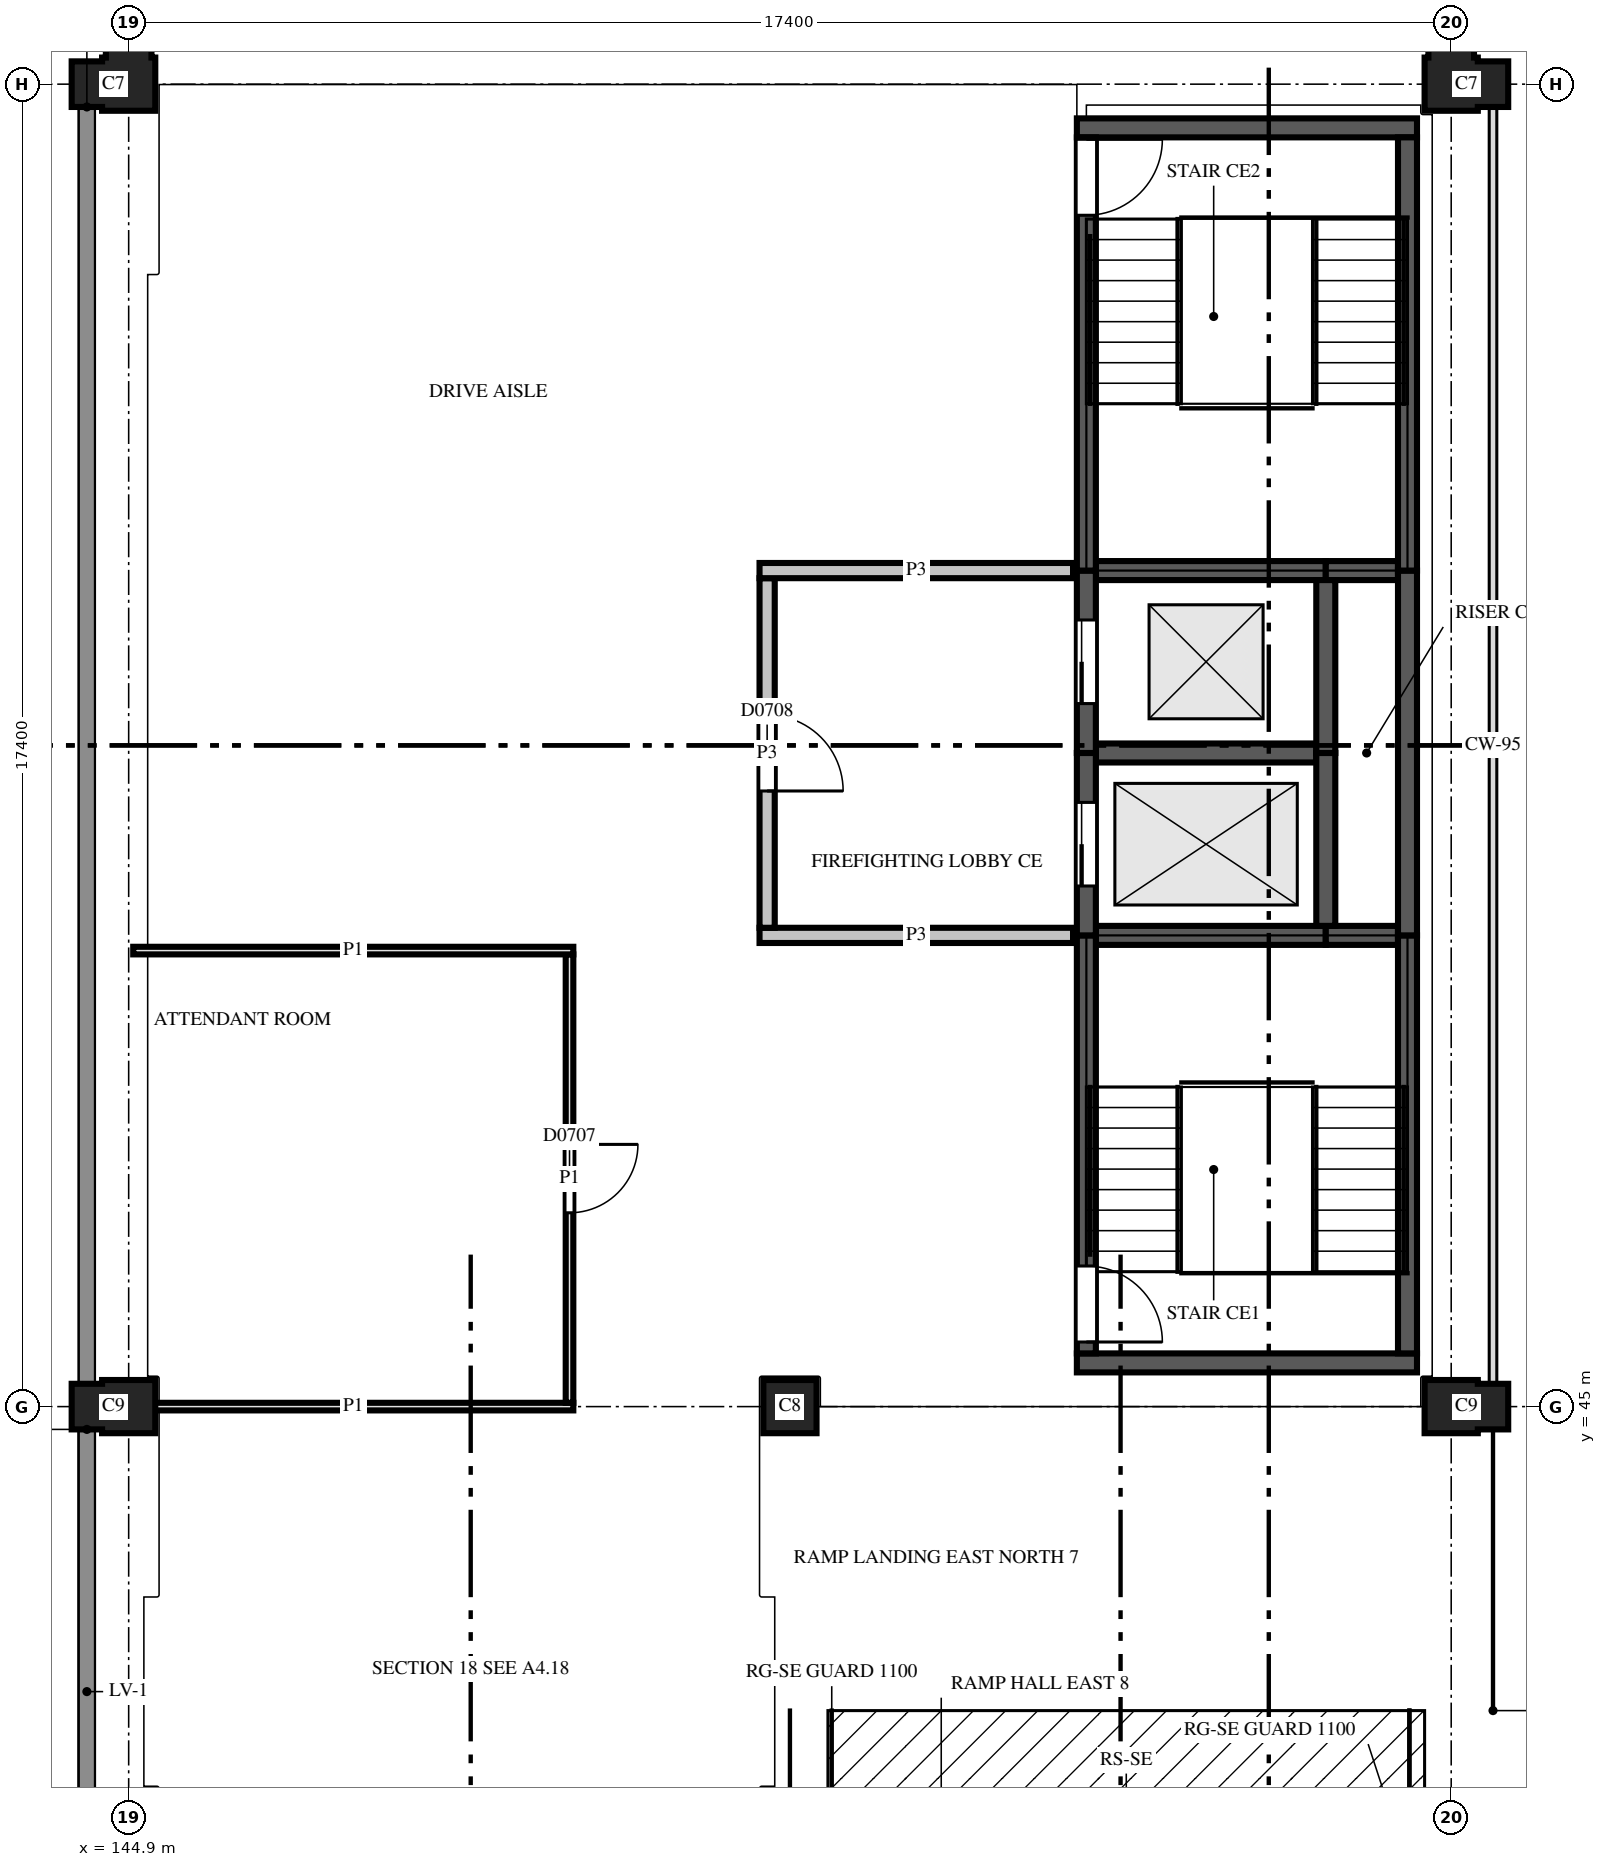
"""IFC4 building model, lengths in metres.
Left out: names, types, materials, properties, quantities, classifications, styles, units other than length and angle.
Written with IfcOpenShell. Run it as: python <this file> out.ifc"""

import sys

from ifc_helpers import new_model, si_unit, direction, frame, frame_2d, origin, place, context, subcontext, project, spatial, polyline, rectangle, outline, extrude, element, fill, save


model = new_model("IFC4")
c1 = context("Model", 3, precision=1e-05, world=origin(), true_north=direction((0.0, 1.0)))
c2 = subcontext(c1, "Body", "Model", "MODEL_VIEW")
j1 = project(units=[si_unit("LENGTHUNIT", "METRE"), si_unit("PLANEANGLEUNIT", "RADIAN")], contexts=[c1])
p1 = place(None, origin())
s1 = spatial("IfcSite", under=j1, at=p1, CompositionType="ELEMENT")
p2 = place(p1, origin())
s2 = spatial("IfcBuilding", under=s1, at=p2, CompositionType="ELEMENT")
p3 = place(p2, frame((0.0, 0.0, 26.7)))
s3 = spatial("IfcBuildingStorey", under=s2, at=p3, CompositionType="ELEMENT", Elevation=26.7)
p4 = place(p3, frame((144.9, 45.0, 0.0), z_axis=(0.0, 0.0, 1.0), x_axis=(-1.0, 0.0, 0.0)))
e1 = element("IfcColumn", 1, at=p4, inside=s3, PredefinedType="COLUMN", context=c2, shape_type="SweptSolid", body=[
    extrude(outline(polyline([(-0.35, -0.35), (0.35, -0.35), (0.35, -0.3), (0.75, -0.3), (0.75, 0.3), (0.35, 0.3), (0.35, 0.35), (-0.35, 0.35), (-0.35, -0.35)])), origin(), (0.0, 0.0, 1.0), 3.7),
])
p5 = place(p3, frame((153.6, 45.0, 0.0), z_axis=(0.0, 0.0, 1.0), x_axis=(1.0, 0.0, 0.0)))
e2 = element("IfcColumn", 2, at=p5, inside=s3, PredefinedType="COLUMN", context=c2, shape_type="SweptSolid", body=[
    extrude(outline(polyline([(-0.35, -0.35), (0.35, -0.35), (0.35, 0.35), (-0.35, 0.35), (-0.35, -0.35)])), origin(), (0.0, 0.0, 1.0), 3.7),
])
p6 = place(p3, frame((162.3, 45.0, 0.0), z_axis=(0.0, 0.0, 1.0), x_axis=(1.0, 0.0, 0.0)))
e3 = element("IfcColumn", 3, at=p6, inside=s3, PredefinedType="COLUMN", context=c2, shape_type="SweptSolid", body=[
    extrude(outline(polyline([(-0.35, -0.35), (0.35, -0.35), (0.35, -0.3), (0.75, -0.3), (0.75, 0.3), (0.35, 0.3), (0.35, 0.35), (-0.35, 0.35), (-0.35, -0.35)])), origin(), (0.0, 0.0, 1.0), 3.7),
])
for number, where, z_axis, x_axis in (
    (4, (144.9, 62.4, 0.0), (0.0, 0.0, 1.0), (0.0, 1.0, 0.0)),
    (5, (162.3, 62.4, 0.0), (0.0, 0.0, 1.0), (1.0, 0.0, 0.0)),
):
    element("IfcColumn", number, at=place(p3, frame(where, z_axis=z_axis, x_axis=x_axis)), inside=s3, PredefinedType="COLUMN", context=c2, shape_type="SweptSolid", body=[
        extrude(outline(polyline([(-0.35, -0.35), (0.35, -0.35), (0.35, -0.3), (0.75, -0.3), (0.75, 0.3), (0.35, 0.3), (0.35, 0.35), (0.3, 0.35), (0.3, 0.75), (-0.3, 0.75), (-0.3, 0.35), (-0.35, 0.35), (-0.35, -0.35)])), origin(), (0.0, 0.0, 1.0), 3.7),
    ])
p7 = place(p3, frame((157.375, 45.575, 0.0), z_axis=(0.0, 0.0, 1.0), x_axis=(1.0, 0.0, 0.0)))
e6 = element("IfcWall", 6, at=p7, inside=s3, PredefinedType="SHEAR", context=c2, shape_type="SweptSolid", body=[
    extrude(rectangle(XDim=4.475, YDim=0.25, at=frame_2d((2.238, 0.0))), origin(), (0.0, 0.0, 1.0), 3.7),
])
p8 = place(p3, frame((157.625, 51.2, 0.0), z_axis=(0.0, 0.0, 1.0), x_axis=(1.0, 0.0, 0.0)))
e7 = element("IfcWall", 7, at=p8, inside=s3, PredefinedType="SHEAR", context=c2, shape_type="SweptSolid", body=[
    extrude(rectangle(XDim=3.025, YDim=0.25, at=frame_2d((1.512, 0.0))), origin(), (0.0, 0.0, 1.0), 3.7),
])
p9 = place(p3, frame((160.65, 51.2, 0.0), z_axis=(0.0, 0.0, 1.0), x_axis=(1.0, 0.0, 0.0)))
e8 = element("IfcWall", 8, at=p9, inside=s3, PredefinedType="SHEAR", context=c2, shape_type="SweptSolid", body=[
    extrude(rectangle(XDim=0.95, YDim=0.25, at=frame_2d((0.475, 0.0))), origin(), (0.0, 0.0, 1.0), 3.7),
])
p10 = place(p3, frame((157.625, 53.6, 0.0), z_axis=(0.0, 0.0, 1.0), x_axis=(1.0, 0.0, 0.0)))
e9 = element("IfcWall", 9, at=p10, inside=s3, PredefinedType="SHEAR", context=c2, shape_type="SweptSolid", body=[
    extrude(rectangle(XDim=2.9, YDim=0.25, at=frame_2d((1.45, 0.0))), origin(), (0.0, 0.0, 1.0), 3.7),
])
p11 = place(p3, frame((157.625, 56.0, 0.0), z_axis=(0.0, 0.0, 1.0), x_axis=(1.0, 0.0, 0.0)))
e10 = element("IfcWall", 10, at=p11, inside=s3, PredefinedType="SHEAR", context=c2, shape_type="SweptSolid", body=[
    extrude(rectangle(XDim=3.025, YDim=0.25, at=frame_2d((1.512, 0.0))), origin(), (0.0, 0.0, 1.0), 3.7),
])
p12 = place(p3, frame((160.65, 56.0, 0.0), z_axis=(0.0, 0.0, 1.0), x_axis=(1.0, 0.0, 0.0)))
e11 = element("IfcWall", 11, at=p12, inside=s3, PredefinedType="SHEAR", context=c2, shape_type="SweptSolid", body=[
    extrude(rectangle(XDim=0.95, YDim=0.25, at=frame_2d((0.475, 0.0))), origin(), (0.0, 0.0, 1.0), 3.7),
])
p13 = place(p3, frame((157.375, 61.825, 0.0), z_axis=(0.0, 0.0, 1.0), x_axis=(1.0, 0.0, 0.0)))
e12 = element("IfcWall", 12, at=p13, inside=s3, PredefinedType="SHEAR", context=c2, shape_type="SweptSolid", body=[
    extrude(rectangle(XDim=4.475, YDim=0.25, at=frame_2d((2.238, 0.0))), origin(), (0.0, 0.0, 1.0), 3.7),
])
p14 = place(p3, frame((157.5, 45.7, 0.0), z_axis=(0.0, 0.0, 1.0), x_axis=(0.0, 1.0, 0.0)))
e13 = element("IfcWall", 13, at=p14, inside=s3, PredefinedType="SHEAR", context=c2, shape_type="SweptSolid", body=[
    extrude(rectangle(XDim=5.5, YDim=0.25, at=frame_2d((2.75, 0.0))), origin(), (0.0, 0.0, 1.0), 3.7),
])
p15 = place(p14, frame((0.15, 0.0, 0.0)))
e14 = element("IfcOpeningElement", 14, at=p15, cuts=e13, PredefinedType="OPENING", context=c2, shape_type="SweptSolid", body=[
    extrude(rectangle(XDim=1.0, YDim=2.1, at=frame_2d((0.5, 1.05))), frame((0.0, 0.135, 0.0), z_axis=(0.0, -1.0, 0.0), x_axis=(1.0, 0.0, 0.0)), (0.0, 0.0, 1.0), 0.27),
])
p16 = place(p3, frame((157.5, 51.2, 0.0), z_axis=(0.0, 0.0, 1.0), x_axis=(0.0, 1.0, 0.0)))
e15 = element("IfcWall", 15, at=p16, inside=s3, PredefinedType="SHEAR", context=c2, shape_type="SweptSolid", body=[
    extrude(rectangle(XDim=2.4, YDim=0.25, at=frame_2d((1.2, 0.0))), origin(), (0.0, 0.0, 1.0), 3.7),
])
p17 = place(p16, frame((0.65, 0.0, 0.0)))
e16 = element("IfcOpeningElement", 16, at=p17, cuts=e15, PredefinedType="OPENING", context=c2, shape_type="SweptSolid", body=[
    extrude(rectangle(XDim=1.1, YDim=2.1, at=frame_2d((0.55, 1.05))), frame((0.0, 0.135, 0.0), z_axis=(0.0, -1.0, 0.0), x_axis=(1.0, 0.0, 0.0)), (0.0, 0.0, 1.0), 0.27),
])
p18 = place(p3, frame((157.5, 53.6, 0.0), z_axis=(0.0, 0.0, 1.0), x_axis=(0.0, 1.0, 0.0)))
e17 = element("IfcWall", 17, at=p18, inside=s3, PredefinedType="SHEAR", context=c2, shape_type="SweptSolid", body=[
    extrude(rectangle(XDim=2.4, YDim=0.25, at=frame_2d((1.2, 0.0))), origin(), (0.0, 0.0, 1.0), 3.7),
])
p19 = place(p18, frame((0.65, 0.0, 0.0)))
e18 = element("IfcOpeningElement", 18, at=p19, cuts=e17, PredefinedType="OPENING", context=c2, shape_type="SweptSolid", body=[
    extrude(rectangle(XDim=1.1, YDim=2.1, at=frame_2d((0.55, 1.05))), frame((0.0, 0.135, 0.0), z_axis=(0.0, -1.0, 0.0), x_axis=(1.0, 0.0, 0.0)), (0.0, 0.0, 1.0), 0.27),
])
p20 = place(p3, frame((157.5, 56.0, 0.0), z_axis=(0.0, 0.0, 1.0), x_axis=(0.0, 1.0, 0.0)))
e19 = element("IfcWall", 19, at=p20, inside=s3, PredefinedType="SHEAR", context=c2, shape_type="SweptSolid", body=[
    extrude(rectangle(XDim=5.7, YDim=0.25, at=frame_2d((2.85, 0.0))), origin(), (0.0, 0.0, 1.0), 3.7),
])
p21 = place(p20, frame((4.675, 0.0, 0.0)))
e20 = element("IfcOpeningElement", 20, at=p21, cuts=e19, PredefinedType="OPENING", context=c2, shape_type="SweptSolid", body=[
    extrude(rectangle(XDim=1.0, YDim=2.1, at=frame_2d((0.5, 1.05))), frame((0.0, 0.135, 0.0), z_axis=(0.0, -1.0, 0.0), x_axis=(1.0, 0.0, 0.0)), (0.0, 0.0, 1.0), 0.27),
])
p22 = place(p3, frame((160.65, 51.325, 0.0), z_axis=(0.0, 0.0, 1.0), x_axis=(0.0, 1.0, 0.0)))
e21 = element("IfcWall", 21, at=p22, inside=s3, PredefinedType="SHEAR", context=c2, shape_type="SweptSolid", body=[
    extrude(rectangle(XDim=2.275, YDim=0.25, at=frame_2d((1.138, 0.0))), origin(), (0.0, 0.0, 1.0), 3.7),
])
p23 = place(p3, frame((160.65, 53.6, 0.0), z_axis=(0.0, 0.0, 1.0), x_axis=(0.0, 1.0, 0.0)))
e22 = element("IfcWall", 22, at=p23, inside=s3, PredefinedType="SHEAR", context=c2, shape_type="SweptSolid", body=[
    extrude(rectangle(XDim=2.275, YDim=0.25, at=frame_2d((1.137, 0.0))), origin(), (0.0, 0.0, 1.0), 3.7),
])
p24 = place(p3, frame((161.725, 45.7, 0.0), z_axis=(0.0, 0.0, 1.0), x_axis=(0.0, 1.0, 0.0)))
e23 = element("IfcWall", 23, at=p24, inside=s3, PredefinedType="SHEAR", context=c2, shape_type="SweptSolid", body=[
    extrude(rectangle(XDim=5.5, YDim=0.25, at=frame_2d((2.75, 0.0))), origin(), (0.0, 0.0, 1.0), 3.7),
])
p25 = place(p3, frame((161.725, 51.2, 0.0), z_axis=(0.0, 0.0, 1.0), x_axis=(0.0, 1.0, 0.0)))
e24 = element("IfcWall", 24, at=p25, inside=s3, PredefinedType="SHEAR", context=c2, shape_type="SweptSolid", body=[
    extrude(rectangle(XDim=4.8, YDim=0.25, at=frame_2d((2.4, 0.0))), origin(), (0.0, 0.0, 1.0), 3.7),
])
p26 = place(p3, frame((161.725, 56.0, 0.0), z_axis=(0.0, 0.0, 1.0), x_axis=(0.0, 1.0, 0.0)))
e25 = element("IfcWall", 25, at=p26, inside=s3, PredefinedType="SHEAR", context=c2, shape_type="SweptSolid", body=[
    extrude(rectangle(XDim=5.7, YDim=0.25, at=frame_2d((2.85, 0.0))), origin(), (0.0, 0.0, 1.0), 3.7),
])
p27 = place(p3, frame((144.96, 45.0, 0.0), z_axis=(0.0, 0.0, 1.0), x_axis=(1.0, 0.0, 0.0)))
e26 = element("IfcWall", 26, at=p27, inside=s3, PredefinedType="PARTITIONING", context=c2, shape_type="SweptSolid", body=[
    extrude(rectangle(XDim=5.79, YDim=0.1, at=frame_2d((2.895, 0.0))), origin(), (0.0, 0.0, 1.0), 2.88),
])
p28 = place(p3, frame((150.7, 45.05, 0.0), z_axis=(0.0, 0.0, 1.0), x_axis=(0.0, 1.0, 0.0)))
e27 = element("IfcWall", 27, at=p28, inside=s3, PredefinedType="PARTITIONING", context=c2, shape_type="SweptSolid", body=[
    extrude(rectangle(XDim=5.9, YDim=0.1, at=frame_2d((2.95, 0.0))), origin(), (0.0, 0.0, 1.0), 2.88),
])
p29 = place(p28, frame((2.5, 0.0, 0.0)))
e28 = element("IfcOpeningElement", 28, at=p29, cuts=e27, PredefinedType="OPENING", context=c2, shape_type="SweptSolid", body=[
    extrude(rectangle(XDim=0.9, YDim=2.1, at=frame_2d((0.45, 1.05))), frame((0.0, 0.06, 0.0), z_axis=(0.0, -1.0, 0.0), x_axis=(1.0, 0.0, 0.0)), (0.0, 0.0, 1.0), 0.12),
])
p30 = place(p3, frame((150.75, 51.0, 0.0), z_axis=(0.0, 0.0, 1.0), x_axis=(-1.0, 0.0, 0.0)))
e29 = element("IfcWall", 29, at=p30, inside=s3, PredefinedType="PARTITIONING", context=c2, shape_type="SweptSolid", body=[
    extrude(rectangle(XDim=5.79, YDim=0.1, at=frame_2d((2.895, 0.0))), origin(), (0.0, 0.0, 1.0), 2.88),
])
p31 = place(p3, frame((153.2, 51.2, 0.0), z_axis=(0.0, 0.0, 1.0), x_axis=(1.0, 0.0, 0.0)))
e30 = element("IfcWall", 30, at=p31, inside=s3, PredefinedType="PARTITIONING", context=c2, shape_type="SweptSolid", body=[
    extrude(rectangle(XDim=4.125, YDim=0.2, at=frame_2d((2.062, 0.0))), origin(), (0.0, 0.0, 1.0), 2.88),
])
p32 = place(p3, frame((153.3, 55.9, 0.0), z_axis=(0.0, 0.0, 1.0), x_axis=(0.0, -1.0, 0.0)))
e31 = element("IfcWall", 31, at=p32, inside=s3, PredefinedType="PARTITIONING", context=c2, shape_type="SweptSolid", body=[
    extrude(rectangle(XDim=4.6, YDim=0.2, at=frame_2d((2.3, 0.0))), origin(), (0.0, 0.0, 1.0), 2.88),
])
p33 = place(p32, frame((1.8, 0.0, 0.0)))
e32 = element("IfcOpeningElement", 32, at=p33, cuts=e31, PredefinedType="OPENING", context=c2, shape_type="SweptSolid", body=[
    extrude(rectangle(XDim=1.0, YDim=2.1, at=frame_2d((0.5, 1.05))), frame((0.0, 0.11, 0.0), z_axis=(0.0, -1.0, 0.0), x_axis=(1.0, 0.0, 0.0)), (0.0, 0.0, 1.0), 0.22),
])
p34 = place(p3, frame((157.325, 56.0, 0.0), z_axis=(0.0, 0.0, 1.0), x_axis=(-1.0, 0.0, 0.0)))
e33 = element("IfcWall", 33, at=p34, inside=s3, PredefinedType="PARTITIONING", context=c2, shape_type="SweptSolid", body=[
    extrude(rectangle(XDim=4.125, YDim=0.2, at=frame_2d((2.062, 0.0))), origin(), (0.0, 0.0, 1.0), 2.88),
])
p35 = place(p29, origin())
e34 = element("IfcDoor", 34, at=p35, inside=s3, OperationType="SINGLE_SWING_RIGHT", PredefinedType="DOOR", context=c2, shape_type="SweptSolid", body=[
    extrude(rectangle(XDim=0.9, YDim=2.1, at=frame_2d((0.45, 1.05))), frame((0.0, 0.025, 0.0), z_axis=(0.0, -1.0, 0.0), x_axis=(1.0, 0.0, 0.0)), (0.0, 0.0, 1.0), 0.05),
])
fill(e28, e34)
p36 = place(p33, origin())
e35 = element("IfcDoor", 35, at=p36, inside=s3, OperationType="SINGLE_SWING_LEFT", PredefinedType="DOOR", context=c2, shape_type="SweptSolid", body=[
    extrude(rectangle(XDim=1.0, YDim=2.1, at=frame_2d((0.5, 1.05))), frame((0.0, 0.025, 0.0), z_axis=(0.0, -1.0, 0.0), x_axis=(1.0, 0.0, 0.0)), (0.0, 0.0, 1.0), 0.05),
])
fill(e32, e35)
p37 = place(p17, origin())
e36 = element("IfcDoor", 36, at=p37, inside=s3, OperationType="SLIDING_TO_LEFT", PredefinedType="DOOR", context=c2, shape_type="SweptSolid", body=[
    extrude(rectangle(XDim=1.1, YDim=2.1, at=frame_2d((0.55, 1.05))), frame((0.0, 0.025, 0.0), z_axis=(0.0, -1.0, 0.0), x_axis=(1.0, 0.0, 0.0)), (0.0, 0.0, 1.0), 0.05),
])
fill(e16, e36)
p38 = place(p19, origin())
e37 = element("IfcDoor", 37, at=p38, inside=s3, OperationType="SLIDING_TO_LEFT", PredefinedType="DOOR", context=c2, shape_type="SweptSolid", body=[
    extrude(rectangle(XDim=1.1, YDim=2.1, at=frame_2d((0.55, 1.05))), frame((0.0, 0.025, 0.0), z_axis=(0.0, -1.0, 0.0), x_axis=(1.0, 0.0, 0.0)), (0.0, 0.0, 1.0), 0.05),
])
fill(e18, e37)
p39 = place(p21, origin())
e38 = element("IfcDoor", 38, at=p39, inside=s3, OperationType="SINGLE_SWING_RIGHT", PredefinedType="DOOR", context=c2, shape_type="SweptSolid", body=[
    extrude(rectangle(XDim=1.0, YDim=2.1, at=frame_2d((0.5, 1.05))), frame((0.0, 0.025, 0.0), z_axis=(0.0, -1.0, 0.0), x_axis=(1.0, 0.0, 0.0)), (0.0, 0.0, 1.0), 0.05),
])
fill(e20, e38)
p40 = place(p15, origin())
e39 = element("IfcDoor", 39, at=p40, inside=s3, OperationType="SINGLE_SWING_LEFT", PredefinedType="DOOR", context=c2, shape_type="SweptSolid", body=[
    extrude(rectangle(XDim=1.0, YDim=2.1, at=frame_2d((0.5, 1.05))), frame((0.0, 0.025, 0.0), z_axis=(0.0, -1.0, 0.0), x_axis=(1.0, 0.0, 0.0)), (0.0, 0.0, 1.0), 0.05),
])
fill(e14, e39)
save(model, sys.argv[1])
